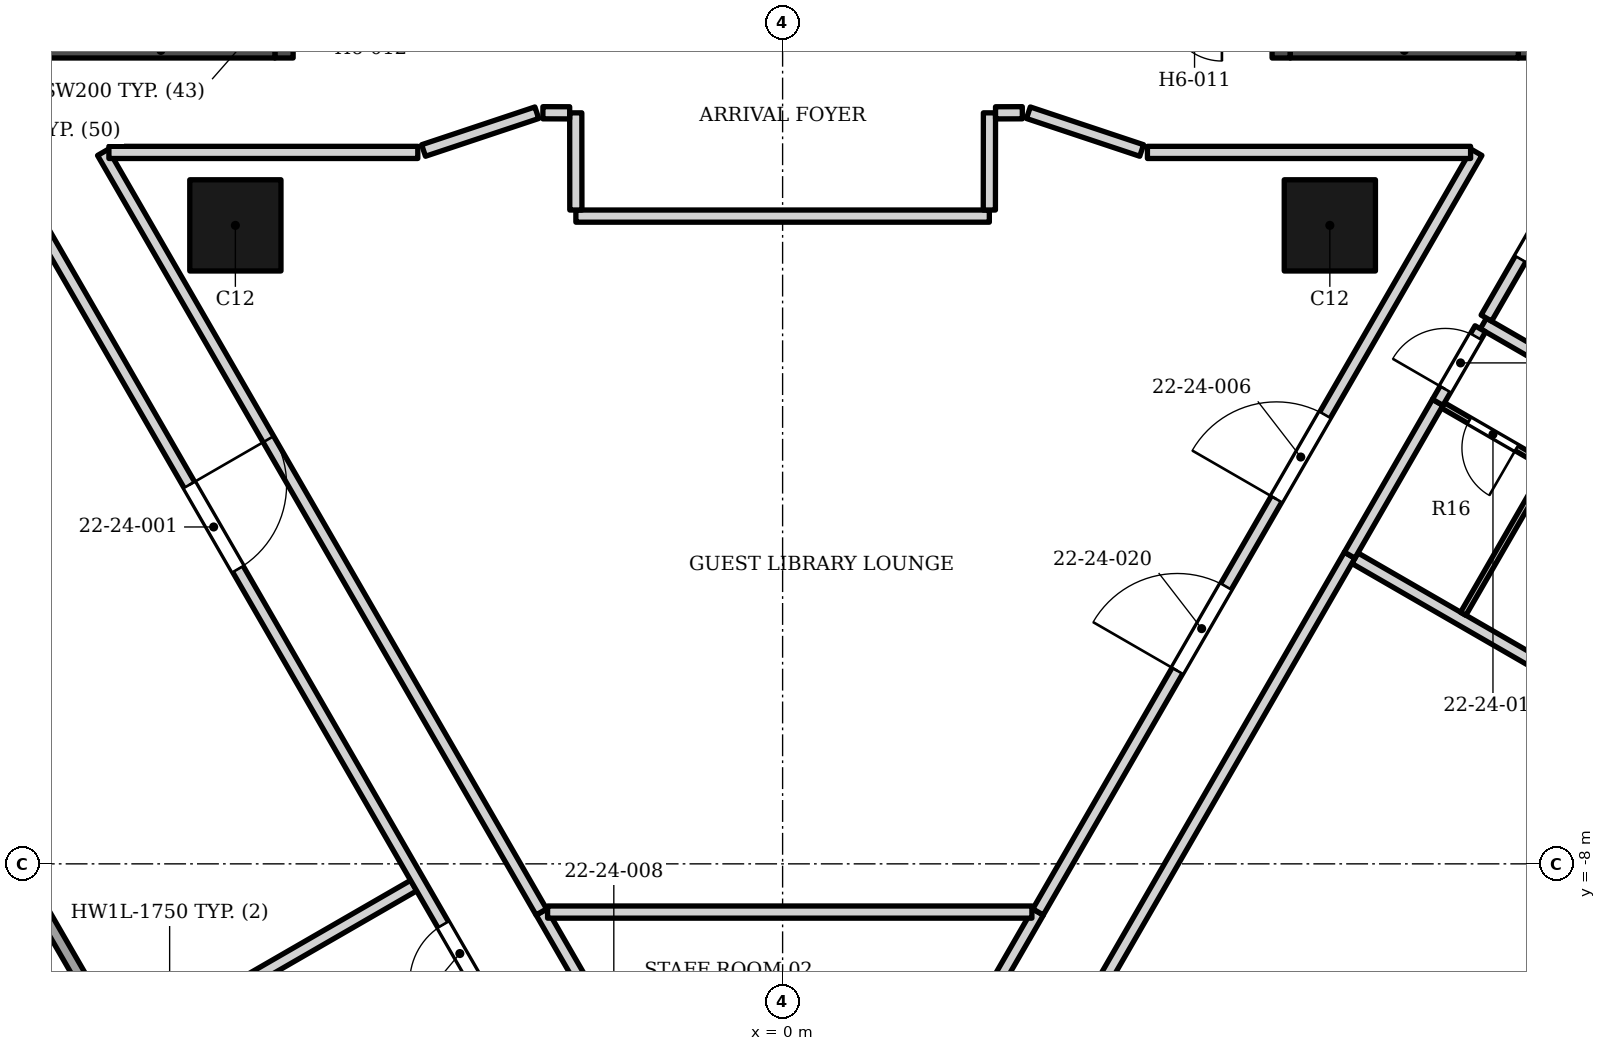
"""IFC4 building model, lengths in metres.
Left out: names, types, materials, properties, quantities, classifications, styles, units other than length and angle.
Written with IfcOpenShell. Run it as: python <this file> out.ifc"""

import sys

from ifc_helpers import new_model, si_unit, direction, frame, frame_2d, origin, origin_2d, place, context, subcontext, project, spatial, rectangle, extrude, element, fill, save


model = new_model("IFC4")
c1 = context("Model", 3, precision=1e-05, world=origin(), true_north=direction((0.0, 1.0)))
c2 = subcontext(c1, "Body", "Model", "MODEL_VIEW")
j1 = project(units=[si_unit("LENGTHUNIT", "METRE"), si_unit("PLANEANGLEUNIT", "RADIAN")], contexts=[c1])
p1 = place(None, origin())
s1 = spatial("IfcSite", under=j1, at=p1, CompositionType="ELEMENT")
p2 = place(p1, origin())
s2 = spatial("IfcBuilding", under=s1, at=p2, CompositionType="ELEMENT")
p3 = place(p2, frame((0.0, 0.0, 102.0)))
s3 = spatial("IfcBuildingStorey", under=s2, at=p3, CompositionType="ELEMENT", Elevation=102.0)
p4 = place(p3, frame((-8.2, 5.253, 0.0), z_axis=(0.0, 0.0, 1.0), x_axis=(0.0, 1.0, 0.0)))
e1 = element("IfcWall", 1, at=p4, inside=s3, PredefinedType="SHEAR", context=c2, shape_type="SweptSolid", body=[
    extrude(rectangle(XDim=13.3, YDim=0.3, at=frame_2d((6.65, 0.0))), origin(), (0.0, 0.0, 1.0), 3.4),
])
p5 = place(p4, frame((7.1, 0.0, 0.0)))
e2 = element("IfcOpeningElement", 2, at=p5, cuts=e1, PredefinedType="OPENING", context=c2, shape_type="SweptSolid", body=[
    extrude(rectangle(XDim=1.4, YDim=2.1, at=frame_2d((0.7, 1.05))), frame((0.0, 0.16, 0.0), z_axis=(0.0, -1.0, 0.0), x_axis=(1.0, 0.0, 0.0)), (0.0, 0.0, 1.0), 0.32),
])
p6 = place(p4, frame((5.05, 0.0, 0.0)))
e3 = element("IfcOpeningElement", 3, at=p6, cuts=e1, PredefinedType="OPENING", context=c2, shape_type="SweptSolid", body=[
    extrude(rectangle(XDim=1.4, YDim=2.1, at=frame_2d((0.7, 1.05))), frame((0.0, 0.16, 0.0), z_axis=(0.0, -1.0, 0.0), x_axis=(1.0, 0.0, 0.0)), (0.0, 0.0, 1.0), 0.32),
])
p7 = place(p3, frame((-12.1, 5.378, 0.0), z_axis=(0.0, 0.0, 1.0), x_axis=(1.0, 0.0, 0.0)))
e4 = element("IfcWall", 4, at=p7, inside=s3, PredefinedType="SHEAR", context=c2, shape_type="SweptSolid", body=[
    extrude(rectangle(XDim=3.75, YDim=0.25, at=frame_2d((1.875, 0.0))), origin(), (0.0, 0.0, 1.0), 3.4),
])
p8 = place(p3, frame((12.35, 5.253, 0.0), z_axis=(0.0, 0.0, 1.0), x_axis=(0.0, 1.0, 0.0)))
e5 = element("IfcWall", 5, at=p8, inside=s3, PredefinedType="SHEAR", context=c2, shape_type="SweptSolid", body=[
    extrude(rectangle(XDim=13.3, YDim=0.5, at=frame_2d((6.65, 0.0))), origin(), (0.0, 0.0, 1.0), 3.4),
])
p9 = place(p3, frame((8.2, 5.253, 0.0), z_axis=(0.0, 0.0, 1.0), x_axis=(0.0, 1.0, 0.0)))
e6 = element("IfcWall", 6, at=p9, inside=s3, PredefinedType="SHEAR", context=c2, shape_type="SweptSolid", body=[
    extrude(rectangle(XDim=13.3, YDim=0.3, at=frame_2d((6.65, 0.0))), origin(), (0.0, 0.0, 1.0), 3.4),
])
p10 = place(p9, frame((7.1, 0.0, 0.0)))
e7 = element("IfcOpeningElement", 7, at=p10, cuts=e6, PredefinedType="OPENING", context=c2, shape_type="SweptSolid", body=[
    extrude(rectangle(XDim=1.4, YDim=2.1, at=frame_2d((0.7, 1.05))), frame((0.0, 0.16, 0.0), z_axis=(0.0, -1.0, 0.0), x_axis=(1.0, 0.0, 0.0)), (0.0, 0.0, 1.0), 0.32),
])
p11 = place(p9, frame((5.05, 0.0, 0.0)))
e8 = element("IfcOpeningElement", 8, at=p11, cuts=e6, PredefinedType="OPENING", context=c2, shape_type="SweptSolid", body=[
    extrude(rectangle(XDim=1.4, YDim=2.1, at=frame_2d((0.7, 1.05))), frame((0.0, 0.16, 0.0), z_axis=(0.0, -1.0, 0.0), x_axis=(1.0, 0.0, 0.0)), (0.0, 0.0, 1.0), 0.32),
])
p12 = place(p3, frame((8.35, 5.378, 0.0), z_axis=(0.0, 0.0, 1.0), x_axis=(1.0, 0.0, 0.0)))
e9 = element("IfcWall", 9, at=p12, inside=s3, PredefinedType="SHEAR", context=c2, shape_type="SweptSolid", body=[
    extrude(rectangle(XDim=3.75, YDim=0.25, at=frame_2d((1.875, 0.0))), origin(), (0.0, 0.0, 1.0), 3.4),
])
for number, where, z_axis, x_axis in (
    (10, (-9.0, 2.5, 0.0), (0.0, 0.0, 1.0), (1.0, 0.0, 0.0)),
    (11, (9.0, 2.5, 0.0), (0.0, 0.0, 1.0), (1.0, 0.0, 0.0)),
):
    element("IfcColumn", number, at=place(p3, frame(where, z_axis=z_axis, x_axis=x_axis)), inside=s3, PredefinedType="COLUMN", context=c2, shape_type="SweptSolid", body=[
        extrude(rectangle(XDim=1.5, YDim=1.5, at=origin_2d()), origin(), (0.0, 0.0, 1.0), 3.4),
    ])
p13 = place(p3, frame((-13.006, -7.338, 0.0), z_axis=(0.0, 0.0, 1.0), x_axis=(0.500002543286, -0.866023935413, 0.0)))
e12 = element("IfcWall", 12, at=p13, inside=s3, PredefinedType="ELEMENTEDWALL", context=c2, shape_type="SweptSolid", body=[
    extrude(rectangle(XDim=4.2, YDim=0.2, at=frame_2d((2.1, 0.0))), origin(), (0.0, 0.0, 1.0), 2.65),
])
p14 = place(p3, frame((0.117, -15.868, 0.0), z_axis=(0.0, 0.0, 1.0), x_axis=(0.500006185809, 0.866021832376, 0.0)))
e13 = element("IfcWall", 13, at=p14, inside=s3, PredefinedType="PARTITIONING", context=c2, shape_type="SweptSolid", body=[
    extrude(rectangle(XDim=8.168, YDim=0.2, at=frame_2d((4.084, 0.0))), origin(), (0.0, 0.0, 1.0), 2.302),
])
p15 = place(p14, frame((3.458, 0.0, 0.0)))
e14 = element("IfcOpeningElement", 14, at=p15, cuts=e13, PredefinedType="OPENING", context=c2, shape_type="SweptSolid", body=[
    extrude(rectangle(XDim=0.9, YDim=2.1, at=frame_2d((0.45, 1.05))), frame((0.0, 0.11, 0.0), z_axis=(0.0, -1.0, 0.0), x_axis=(1.0, 0.0, 0.0)), (0.0, 0.0, 1.0), 0.22),
])
p16 = place(p3, frame((-3.965, -8.793, 0.0), z_axis=(0.0, 0.0, 1.0), x_axis=(0.499992237426, -0.866029885462, 0.0)))
e15 = element("IfcWall", 15, at=p16, inside=s3, PredefinedType="PARTITIONING", context=c2, shape_type="SweptSolid", body=[
    extrude(rectangle(XDim=8.069, YDim=0.2, at=frame_2d((4.034, 0.0))), origin(), (0.0, 0.0, 1.0), 2.45),
])
p17 = place(p16, frame((1.928, 0.0, 0.0)))
e16 = element("IfcOpeningElement", 16, at=p17, cuts=e15, PredefinedType="OPENING", context=c2, shape_type="SweptSolid", body=[
    extrude(rectangle(XDim=0.9, YDim=2.1, at=frame_2d((0.45, 1.05))), frame((0.0, 0.11, 0.0), z_axis=(0.0, -1.0, 0.0), x_axis=(1.0, 0.0, 0.0)), (0.0, 0.0, 1.0), 0.22),
])
p18 = place(p3, frame((-3.865, -8.793, 0.0), z_axis=(0.0, 0.0, 1.0), x_axis=(1.0, 0.0, 0.0)))
e17 = element("IfcWall", 17, at=p18, inside=s3, PredefinedType="PARTITIONING", context=c2, shape_type="SweptSolid", body=[
    extrude(rectangle(XDim=7.965, YDim=0.2, at=frame_2d((3.983, 0.0))), origin(), (0.0, 0.0, 1.0), 2.474),
])
p19 = place(p3, frame((4.201, -8.791, 0.0), z_axis=(0.0, 0.0, 1.0), x_axis=(0.500109238176, 0.865962325907, 0.0)))
e18 = element("IfcWall", 18, at=p19, inside=s3, PredefinedType="PARTITIONING", context=c2, shape_type="SweptSolid", body=[
    extrude(rectangle(XDim=14.424, YDim=0.2, at=frame_2d((7.212, 0.0))), origin(), (0.0, 0.0, 1.0), 2.384),
])
p20 = place(p19, frame((7.839, 0.0, 0.0)))
e19 = element("IfcOpeningElement", 19, at=p20, cuts=e18, PredefinedType="OPENING", context=c2, shape_type="SweptSolid", body=[
    extrude(rectangle(XDim=1.6, YDim=2.1, at=frame_2d((0.8, 1.05))), frame((0.0, 0.11, 0.0), z_axis=(0.0, -1.0, 0.0), x_axis=(1.0, 0.0, 0.0)), (0.0, 0.0, 1.0), 0.22),
])
p21 = place(p19, frame((4.58, 0.0, 0.0)))
e20 = element("IfcOpeningElement", 20, at=p21, cuts=e18, PredefinedType="OPENING", context=c2, shape_type="SweptSolid", body=[
    extrude(rectangle(XDim=1.6, YDim=2.1, at=frame_2d((0.8, 1.05))), frame((0.0, 0.11, 0.0), z_axis=(0.0, -1.0, 0.0), x_axis=(1.0, 0.0, 0.0)), (0.0, 0.0, 1.0), 0.22),
])
p22 = place(p3, frame((-10.441, -10.88, 0.0), z_axis=(0.0, 0.0, 1.0), x_axis=(0.866188805601, 0.49971687289, 0.0)))
e21 = element("IfcWall", 21, at=p22, inside=s3, PredefinedType="PARTITIONING", context=c2, shape_type="SweptSolid", body=[
    extrude(rectangle(XDim=5.05, YDim=0.2, at=frame_2d((2.525, 0.0))), origin(), (0.0, 0.0, 1.0), 2.552),
])
p23 = place(p3, frame((9.412, -2.973, 0.0), z_axis=(0.0, 0.0, 1.0), x_axis=(0.866009125512, -0.500028193735, 0.0)))
e22 = element("IfcWall", 22, at=p23, inside=s3, PredefinedType="PARTITIONING", context=c2, shape_type="SweptSolid", body=[
    extrude(rectangle(XDim=6.198, YDim=0.2, at=frame_2d((3.099, 0.0))), origin(), (0.0, 0.0, 1.0), 2.384),
])
p24 = place(p3, frame((0.325, -18.513, 0.0), z_axis=(0.0, 0.0, 1.0), x_axis=(0.499996012009, 0.86602770624, 0.0)))
e23 = element("IfcWall", 23, at=p24, inside=s3, PredefinedType="PARTITIONING", context=c2, shape_type="SweptSolid", body=[
    extrude(rectangle(XDim=18.0, YDim=0.2, at=frame_2d((9.0, 0.0))), origin(), (0.0, 0.0, 1.0), 2.302),
])
p25 = place(p24, frame((8.2, 0.0, 0.0)))
e24 = element("IfcOpeningElement", 24, at=p25, cuts=e23, PredefinedType="OPENING", context=c2, shape_type="SweptSolid", body=[
    extrude(rectangle(XDim=1.6, YDim=2.1, at=frame_2d((0.8, 1.05))), frame((0.0, 0.11, 0.0), z_axis=(0.0, -1.0, 0.0), x_axis=(1.0, 0.0, 0.0)), (0.0, 0.0, 1.0), 0.22),
])
p26 = place(p3, frame((11.525, 0.886, 0.0), z_axis=(0.0, 0.0, 1.0), x_axis=(0.866148153111, -0.499787331635, 0.0)))
e25 = element("IfcWall", 25, at=p26, inside=s3, PredefinedType="PARTITIONING", context=c2, shape_type="SweptSolid", body=[
    extrude(rectangle(XDim=6.298, YDim=0.2, at=frame_2d((3.149, 0.0))), origin(), (0.0, 0.0, 1.0), 2.384),
])
p27 = place(p3, frame((11.193, -3.888, 0.0), z_axis=(0.0, 0.0, 1.0), x_axis=(0.499996545922, 0.866027397988, 0.0)))
e26 = element("IfcWall", 26, at=p27, inside=s3, PredefinedType="PARTITIONING", context=c2, shape_type="SweptSolid", body=[
    extrude(rectangle(XDim=2.75, YDim=0.1, at=frame_2d((1.375, 0.0))), origin(), (0.0, 0.0, 1.0), 3.23),
])
p28 = place(p3, frame((10.861, -0.461, 0.0), z_axis=(0.0, 0.0, 1.0), x_axis=(0.865624045709, -0.500694529119, 0.0)))
e27 = element("IfcWall", 27, at=p28, inside=s3, PredefinedType="PARTITIONING", context=c2, shape_type="SweptSolid", body=[
    extrude(rectangle(XDim=2.0, YDim=0.1, at=frame_2d((1.0, 0.0))), origin(), (0.0, 0.0, 1.0), 3.23),
])
p29 = place(p28, frame((0.5, 0.0, 0.0)))
e28 = element("IfcOpeningElement", 28, at=p29, cuts=e27, PredefinedType="OPENING", context=c2, shape_type="SweptSolid", body=[
    extrude(rectangle(XDim=0.9, YDim=2.1, at=frame_2d((0.45, 1.05))), frame((0.0, 0.06, 0.0), z_axis=(0.0, -1.0, 0.0), x_axis=(1.0, 0.0, 0.0)), (0.0, 0.0, 1.0), 0.12),
])
p30 = place(p3, frame((9.326, -2.923, 0.0), z_axis=(0.0, 0.0, 1.0), x_axis=(0.499435738433, 0.866350935347, 0.0)))
e29 = element("IfcWall", 29, at=p30, inside=s3, PredefinedType="PARTITIONING", context=c2, shape_type="SweptSolid", body=[
    extrude(rectangle(XDim=2.9, YDim=0.2, at=frame_2d((1.45, 0.0))), origin(), (0.0, 0.0, 1.0), 3.23),
])
p31 = place(p3, frame((10.774, -0.411, 0.0), z_axis=(0.0, 0.0, 1.0), x_axis=(0.500926145599, 0.865490032672, 0.0)))
e30 = element("IfcWall", 30, at=p31, inside=s3, PredefinedType="PARTITIONING", context=c2, shape_type="SweptSolid", body=[
    extrude(rectangle(XDim=1.398, YDim=0.2, at=frame_2d((0.699, 0.0))), origin(), (0.0, 0.0, 1.0), 3.23),
])
p32 = place(p31, frame((0.25, 0.0, 0.0)))
e31 = element("IfcOpeningElement", 31, at=p32, cuts=e30, PredefinedType="OPENING", context=c2, shape_type="SweptSolid", body=[
    extrude(rectangle(XDim=1.0, YDim=2.1, at=frame_2d((0.5, 1.05))), frame((0.0, 0.11, 0.0), z_axis=(0.0, -1.0, 0.0), x_axis=(1.0, 0.0, 0.0)), (0.0, 0.0, 1.0), 0.22),
])
p33 = place(p3, frame((11.574, 0.975, 0.0), z_axis=(0.0, 0.0, 1.0), x_axis=(0.500078475469, 0.86598009121, 0.0)))
e32 = element("IfcWall", 32, at=p33, inside=s3, PredefinedType="PARTITIONING", context=c2, shape_type="SweptSolid", body=[
    extrude(rectangle(XDim=3.146, YDim=0.2, at=frame_2d((1.573, 0.0))), origin(), (0.0, 0.0, 1.0), 3.23),
])
p34 = place(p33, frame((1.122, 0.0, 0.0)))
e33 = element("IfcOpeningElement", 33, at=p34, cuts=e32, PredefinedType="OPENING", context=c2, shape_type="SweptSolid", body=[
    extrude(rectangle(XDim=0.9, YDim=2.1, at=frame_2d((0.45, 1.05))), frame((0.0, 0.11, 0.0), z_axis=(0.0, -1.0, 0.0), x_axis=(1.0, 0.0, 0.0)), (0.0, 0.0, 1.0), 0.22),
])
p35 = place(p3, frame((-3.4, 2.652, 0.0), z_axis=(0.0, 0.0, 1.0), x_axis=(1.0, 0.0, 0.0)))
e34 = element("IfcWall", 34, at=p35, inside=s3, PredefinedType="PARTITIONING", context=c2, shape_type="SweptSolid", body=[
    extrude(rectangle(XDim=6.8, YDim=0.2, at=frame_2d((3.4, 0.0))), origin(), (0.0, 0.0, 1.0), 2.474),
])
p36 = place(p3, frame((-3.402, 4.351, 0.0), z_axis=(0.0, 0.0, 1.0), x_axis=(0.001222119466, -0.999999253212, 0.0)))
e35 = element("IfcWall", 35, at=p36, inside=s3, PredefinedType="PARTITIONING", context=c2, shape_type="SweptSolid", body=[
    extrude(rectangle(XDim=1.598, YDim=0.2, at=frame_2d((0.799, 0.0))), origin(), (0.0, 0.0, 1.0), 3.23),
])
p37 = place(p3, frame((-12.913, 3.699, 0.0), z_axis=(0.0, 0.0, 1.0), x_axis=(0.499907630167, -0.866078726964, 0.0)))
e36 = element("IfcWall", 36, at=p37, inside=s3, PredefinedType="PARTITIONING", context=c2, shape_type="SweptSolid", body=[
    extrude(rectangle(XDim=26.06, YDim=0.2, at=frame_2d((13.03, 0.0))), origin(), (0.0, 0.0, 1.0), 2.384),
])
p38 = place(p37, frame((6.312, 0.0, 0.0)))
e37 = element("IfcOpeningElement", 37, at=p38, cuts=e36, PredefinedType="OPENING", context=c2, shape_type="SweptSolid", body=[
    extrude(rectangle(XDim=1.6, YDim=2.1, at=frame_2d((0.8, 1.05))), frame((0.0, 0.11, 0.0), z_axis=(0.0, -1.0, 0.0), x_axis=(1.0, 0.0, 0.0)), (0.0, 0.0, 1.0), 0.22),
])
p39 = place(p37, frame((14.662, 0.0, 0.0)))
e38 = element("IfcOpeningElement", 38, at=p39, cuts=e36, PredefinedType="OPENING", context=c2, shape_type="SweptSolid", body=[
    extrude(rectangle(XDim=1.1, YDim=2.1, at=frame_2d((0.55, 1.05))), frame((0.0, 0.11, 0.0), z_axis=(0.0, -1.0, 0.0), x_axis=(1.0, 0.0, 0.0)), (0.0, 0.0, 1.0), 0.22),
])
p40 = place(p37, frame((23.911, 0.0, 0.0)))
e39 = element("IfcOpeningElement", 39, at=p40, cuts=e36, PredefinedType="OPENING", context=c2, shape_type="SweptSolid", body=[
    extrude(rectangle(XDim=1.1, YDim=2.1, at=frame_2d((0.55, 1.05))), frame((0.0, 0.11, 0.0), z_axis=(0.0, -1.0, 0.0), x_axis=(1.0, 0.0, 0.0)), (0.0, 0.0, 1.0), 0.22),
])
p41 = place(p3, frame((-11.18, 3.7, 0.0), z_axis=(0.0, 0.0, 1.0), x_axis=(0.499994992015, -0.866028295127, 0.0)))
e40 = element("IfcWall", 40, at=p41, inside=s3, PredefinedType="PARTITIONING", context=c2, shape_type="SweptSolid", body=[
    extrude(rectangle(XDim=14.423, YDim=0.2, at=frame_2d((7.211, 0.0))), origin(), (0.0, 0.0, 1.0), 2.384),
])
p42 = place(p3, frame((-11.08, 3.7, 0.0), z_axis=(0.0, 0.0, 1.0), x_axis=(1.0, 0.0, 0.0)))
e41 = element("IfcWall", 41, at=p42, inside=s3, PredefinedType="PARTITIONING", context=c2, shape_type="SweptSolid", body=[
    extrude(rectangle(XDim=5.08, YDim=0.2, at=frame_2d((2.54, 0.0))), origin(), (0.0, 0.0, 1.0), 2.832),
])
p43 = place(p3, frame((6.0, 3.7, 0.0), z_axis=(0.0, 0.0, 1.0), x_axis=(1.0, 0.0, 0.0)))
e42 = element("IfcWall", 42, at=p43, inside=s3, PredefinedType="PARTITIONING", context=c2, shape_type="SweptSolid", body=[
    extrude(rectangle(XDim=5.315, YDim=0.2, at=frame_2d((2.657, 0.0))), origin(), (0.0, 0.0, 1.0), 2.832),
])
for number, where, z_axis, x_axis in (
    (43, (4.042, 4.352, 0.0), (0.0, 0.0, 1.0), (0.949, -0.316, 0.0)),
    (44, (-5.905, 3.731, 0.0), (0.0, 0.0, 1.0), (0.949, 0.316, 0.0)),
):
    element("IfcWall", number, at=place(p3, frame(where, z_axis=z_axis, x_axis=x_axis)), inside=s3, PredefinedType="PARTITIONING", context=c2, shape_type="SweptSolid", body=[
        extrude(rectangle(XDim=1.964, YDim=0.2, at=frame_2d((0.982, 0.0))), origin(), (0.0, 0.0, 1.0), 2.384),
    ])
p44 = place(p3, frame((-3.942, 4.352, 0.0), z_axis=(0.0, 0.0, 1.0), x_axis=(0.999996159087, -0.00277160798, 0.0)))
e45 = element("IfcWall", 45, at=p44, inside=s3, PredefinedType="PARTITIONING", context=c2, shape_type="SweptSolid", body=[
    extrude(rectangle(XDim=0.44, YDim=0.2, at=frame_2d((0.22, 0.0))), origin(), (0.0, 0.0, 1.0), 3.23),
])
p45 = place(p3, frame((3.4, 2.752, 0.0), z_axis=(0.0, 0.0, 1.0), x_axis=(0.001222119466, 0.999999253212, 0.0)))
e46 = element("IfcWall", 46, at=p45, inside=s3, PredefinedType="PARTITIONING", context=c2, shape_type="SweptSolid", body=[
    extrude(rectangle(XDim=1.598, YDim=0.2, at=frame_2d((0.799, 0.0))), origin(), (0.0, 0.0, 1.0), 3.23),
])
p46 = place(p3, frame((3.502, 4.351, 0.0), z_axis=(0.0, 0.0, 1.0), x_axis=(0.999996159087, 0.00277160798, 0.0)))
e47 = element("IfcWall", 47, at=p46, inside=s3, PredefinedType="PARTITIONING", context=c2, shape_type="SweptSolid", body=[
    extrude(rectangle(XDim=0.44, YDim=0.2, at=frame_2d((0.22, 0.0))), origin(), (0.0, 0.0, 1.0), 3.23),
])
p47 = place(p38, origin())
e48 = element("IfcDoor", 48, at=p47, inside=s3, OperationType="DOUBLE_DOOR_SINGLE_SWING", PredefinedType="DOOR", context=c2, shape_type="SweptSolid", body=[
    extrude(rectangle(XDim=1.6, YDim=2.1, at=frame_2d((0.8, 1.05))), frame((0.0, 0.025, 0.0), z_axis=(0.0, -1.0, 0.0), x_axis=(1.0, 0.0, 0.0)), (0.0, 0.0, 1.0), 0.05),
])
fill(e37, e48)
p48 = place(p39, origin())
e49 = element("IfcDoor", 49, at=p48, inside=s3, OperationType="SINGLE_SWING_RIGHT", PredefinedType="DOOR", context=c2, shape_type="SweptSolid", body=[
    extrude(rectangle(XDim=1.1, YDim=2.1, at=frame_2d((0.55, 1.05))), frame((0.0, 0.025, 0.0), z_axis=(0.0, -1.0, 0.0), x_axis=(1.0, 0.0, 0.0)), (0.0, 0.0, 1.0), 0.05),
])
fill(e38, e49)
p49 = place(p20, origin())
e50 = element("IfcDoor", 50, at=p49, inside=s3, OperationType="DOUBLE_DOOR_SINGLE_SWING", PredefinedType="DOOR", context=c2, shape_type="SweptSolid", body=[
    extrude(rectangle(XDim=1.6, YDim=2.1, at=frame_2d((0.8, 1.05))), frame((0.0, 0.025, 0.0), z_axis=(0.0, -1.0, 0.0), x_axis=(1.0, 0.0, 0.0)), (0.0, 0.0, 1.0), 0.05),
])
fill(e19, e50)
p50 = place(p32, origin())
e51 = element("IfcDoor", 51, at=p50, inside=s3, OperationType="SINGLE_SWING_LEFT", PredefinedType="DOOR", context=c2, shape_type="SweptSolid", body=[
    extrude(rectangle(XDim=1.0, YDim=2.1, at=frame_2d((0.5, 1.05))), frame((0.0, 0.025, 0.0), z_axis=(0.0, -1.0, 0.0), x_axis=(1.0, 0.0, 0.0)), (0.0, 0.0, 1.0), 0.05),
])
fill(e31, e51)
p51 = place(p29, origin())
e52 = element("IfcDoor", 52, at=p51, inside=s3, OperationType="SINGLE_SWING_RIGHT", PredefinedType="DOOR", context=c2, shape_type="SweptSolid", body=[
    extrude(rectangle(XDim=0.9, YDim=2.1, at=frame_2d((0.45, 1.05))), frame((0.0, 0.025, 0.0), z_axis=(0.0, -1.0, 0.0), x_axis=(1.0, 0.0, 0.0)), (0.0, 0.0, 1.0), 0.05),
])
fill(e28, e52)
p52 = place(p34, origin())
e53 = element("IfcDoor", 53, at=p52, inside=s3, OperationType="SINGLE_SWING_RIGHT", PredefinedType="DOOR", context=c2, shape_type="SweptSolid", body=[
    extrude(rectangle(XDim=0.9, YDim=2.1, at=frame_2d((0.45, 1.05))), frame((0.0, 0.025, 0.0), z_axis=(0.0, -1.0, 0.0), x_axis=(1.0, 0.0, 0.0)), (0.0, 0.0, 1.0), 0.05),
])
fill(e33, e53)
p53 = place(p21, origin())
e54 = element("IfcDoor", 54, at=p53, inside=s3, OperationType="DOUBLE_DOOR_SINGLE_SWING", PredefinedType="DOOR", context=c2, shape_type="SweptSolid", body=[
    extrude(rectangle(XDim=1.6, YDim=2.1, at=frame_2d((0.8, 1.05))), frame((0.0, 0.025, 0.0), z_axis=(0.0, -1.0, 0.0), x_axis=(1.0, 0.0, 0.0)), (0.0, 0.0, 1.0), 0.05),
])
fill(e20, e54)
save(model, sys.argv[1])
